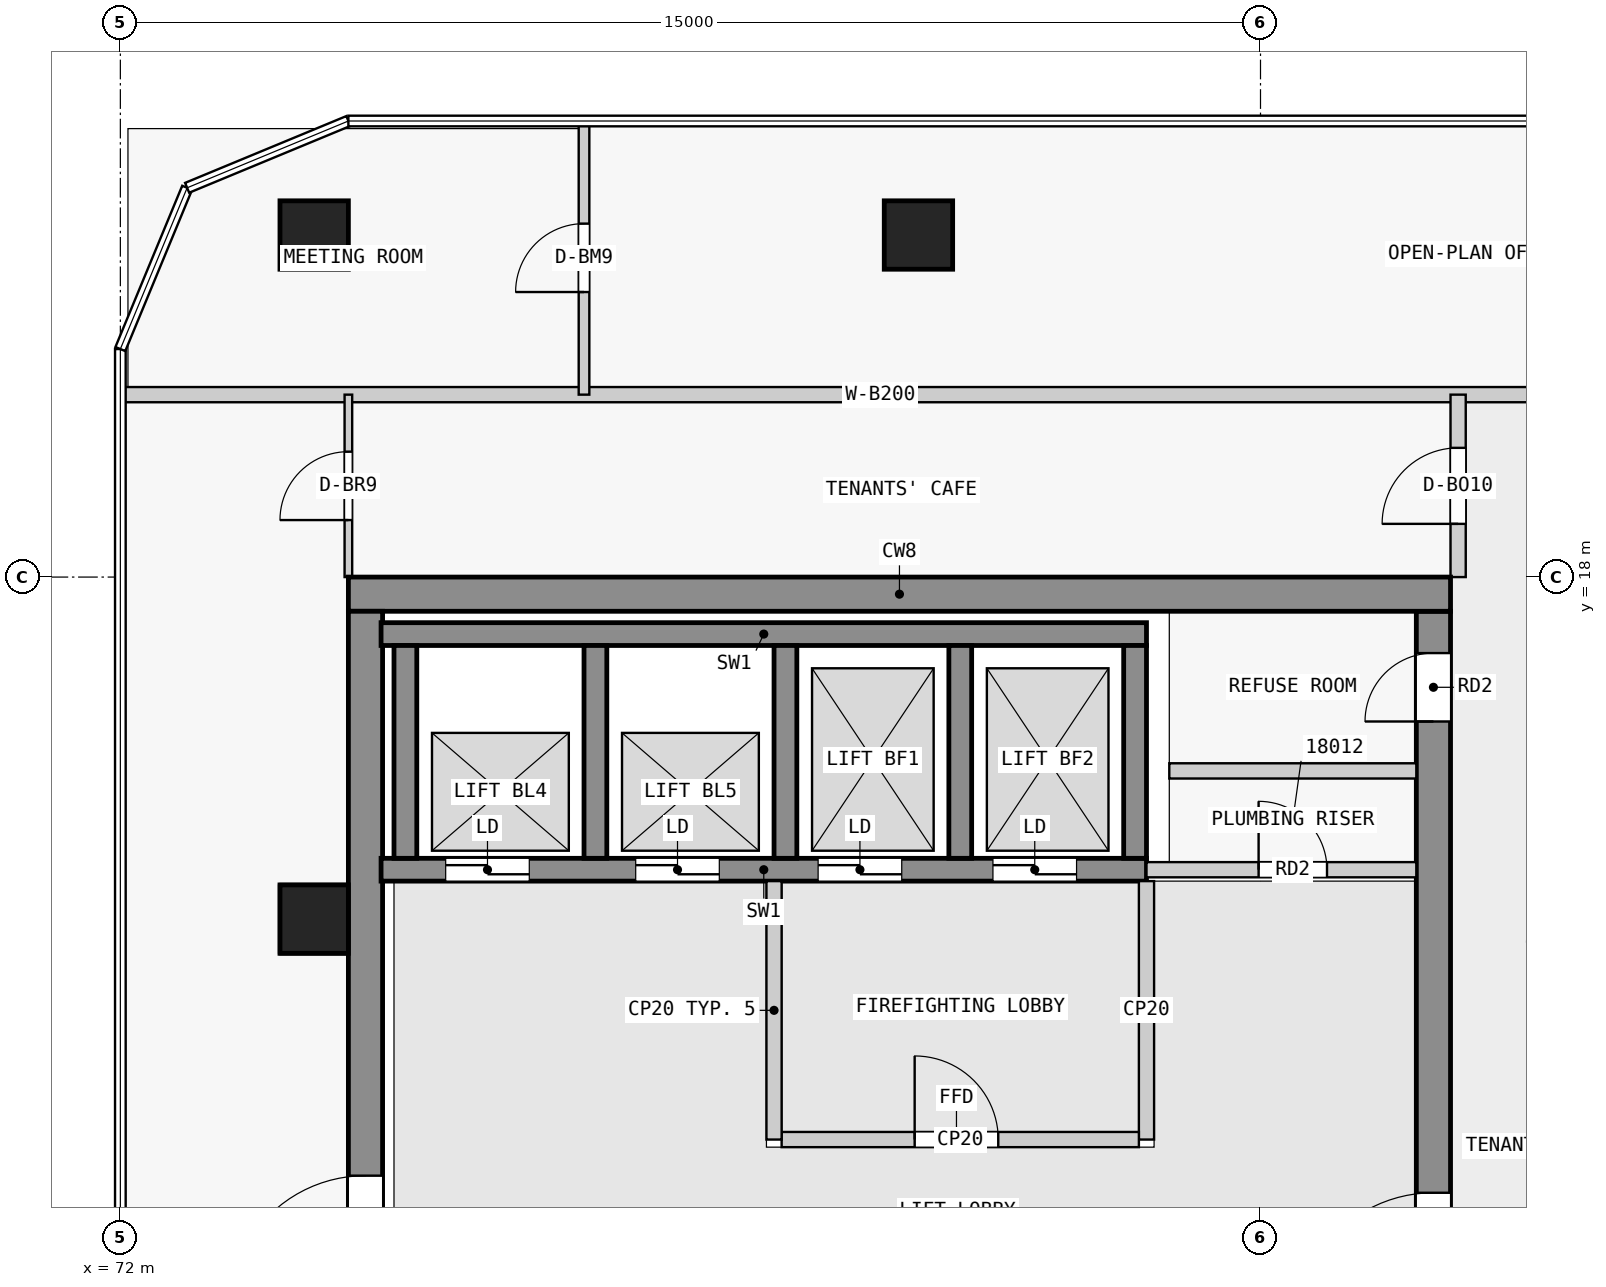
"""IFC4 building model, lengths in metres.
Left out: names, types, materials, properties, quantities, classifications, styles, units other than length and angle.
Written with IfcOpenShell. Run it as: python <this file> out.ifc"""

import sys

from ifc_helpers import new_model, si_unit, direction, frame, frame_2d, origin, origin_2d, place, context, subcontext, project, spatial, rectangle, extrude, element, fill, save


model = new_model("IFC4")
c1 = context("Model", 3, precision=1e-05, world=origin(), true_north=direction((0.0, 1.0)))
c2 = subcontext(c1, "Body", "Model", "MODEL_VIEW")
j1 = project(units=[si_unit("LENGTHUNIT", "METRE"), si_unit("PLANEANGLEUNIT", "RADIAN")], contexts=[c1])
p1 = place(None, origin())
s1 = spatial("IfcSite", under=j1, at=p1, CompositionType="ELEMENT")
p2 = place(p1, origin())
s2 = spatial("IfcBuilding", under=s1, at=p2, CompositionType="ELEMENT")
p3 = place(p2, frame((0.0, 0.0, 72.3)))
s3 = spatial("IfcBuildingStorey", under=s2, at=p3, CompositionType="ELEMENT", Elevation=72.3)
for number, where, z_axis, x_axis in (
    (1, (82.5, 22.5, 0.0), (0.0, 0.0, 1.0), (1.0, 0.0, 0.0)),
    (2, (74.55, 22.5, 0.0), (0.0, 0.0, 1.0), (1.0, 0.0, 0.0)),
    (3, (74.55, 13.5, 0.0), (0.0, 0.0, 1.0), (1.0, 0.0, 0.0)),
):
    element("IfcColumn", number, at=place(p3, frame(where, z_axis=z_axis, x_axis=x_axis)), inside=s3, PredefinedType="COLUMN", context=c2, shape_type="SweptSolid", body=[
        extrude(rectangle(XDim=0.9, YDim=0.9, at=origin_2d()), origin(), (0.0, 0.0, 1.0), 6.0),
    ])
p4 = place(p3, frame((75.0, 17.775, 0.0), z_axis=(0.0, 0.0, 1.0), x_axis=(1.0, 0.0, 0.0)))
e4 = element("IfcWall", 4, at=p4, inside=s3, PredefinedType="SHEAR", context=c2, shape_type="SweptSolid", body=[
    extrude(rectangle(XDim=14.5, YDim=0.45, at=frame_2d((7.25, 0.0))), origin(), (0.0, 0.0, 1.0), 5.75),
])
p5 = place(p3, frame((75.225, 0.45, 0.0), z_axis=(0.0, 0.0, 1.0), x_axis=(0.0, 1.0, 0.0)))
e5 = element("IfcWall", 5, at=p5, inside=s3, PredefinedType="SHEAR", context=c2, shape_type="SweptSolid", body=[
    extrude(rectangle(XDim=17.1, YDim=0.45, at=frame_2d((8.55, 0.0))), origin(), (0.0, 0.0, 1.0), 5.75),
])
p6 = place(p5, frame((7.875, 0.0, 0.0)))
e6 = element("IfcOpeningElement", 6, at=p6, cuts=e5, PredefinedType="OPENING", context=c2, shape_type="SweptSolid", body=[
    extrude(rectangle(XDim=1.8, YDim=2.1, at=frame_2d((0.9, 1.05))), frame((0.0, 0.235, 0.0), z_axis=(0.0, -1.0, 0.0), x_axis=(1.0, 0.0, 0.0)), (0.0, 0.0, 1.0), 0.47),
])
p7 = place(p3, frame((89.275, 0.45, 0.0), z_axis=(0.0, 0.0, 1.0), x_axis=(0.0, 1.0, 0.0)))
e7 = element("IfcWall", 7, at=p7, inside=s3, PredefinedType="SHEAR", context=c2, shape_type="SweptSolid", body=[
    extrude(rectangle(XDim=17.1, YDim=0.45, at=frame_2d((8.55, 0.0))), origin(), (0.0, 0.0, 1.0), 5.75),
])
p8 = place(p7, frame((7.65, 0.0, 0.0)))
e8 = element("IfcOpeningElement", 8, at=p8, cuts=e7, PredefinedType="OPENING", context=c2, shape_type="SweptSolid", body=[
    extrude(rectangle(XDim=1.8, YDim=2.1, at=frame_2d((0.9, 1.05))), frame((0.0, 0.235, 0.0), z_axis=(0.0, -1.0, 0.0), x_axis=(1.0, 0.0, 0.0)), (0.0, 0.0, 1.0), 0.47),
])
p9 = place(p7, frame((15.65, 0.0, 0.0)))
e9 = element("IfcOpeningElement", 9, at=p9, cuts=e7, PredefinedType="OPENING", context=c2, shape_type="SweptSolid", body=[
    extrude(rectangle(XDim=0.9, YDim=2.1, at=frame_2d((0.45, 1.05))), frame((0.0, 0.235, 0.0), z_axis=(0.0, -1.0, 0.0), x_axis=(1.0, 0.0, 0.0)), (0.0, 0.0, 1.0), 0.47),
])
p10 = place(p3, frame((75.43, 17.25, 0.0), z_axis=(0.0, 0.0, 1.0), x_axis=(1.0, 0.0, 0.0)))
e10 = element("IfcWall", 10, at=p10, inside=s3, PredefinedType="SHEAR", context=c2, shape_type="SweptSolid", body=[
    extrude(rectangle(XDim=10.07, YDim=0.3, at=frame_2d((5.035, 0.0))), origin(), (0.0, 0.0, 1.0), 5.75),
])
p11 = place(p3, frame((75.43, 14.15, 0.0), z_axis=(0.0, 0.0, 1.0), x_axis=(1.0, 0.0, 0.0)))
e11 = element("IfcWall", 11, at=p11, inside=s3, PredefinedType="SHEAR", context=c2, shape_type="SweptSolid", body=[
    extrude(rectangle(XDim=10.07, YDim=0.3, at=frame_2d((5.035, 0.0))), origin(), (0.0, 0.0, 1.0), 5.75),
])
p12 = place(p11, frame((0.85, 0.0, 0.0)))
e12 = element("IfcOpeningElement", 12, at=p12, cuts=e11, PredefinedType="OPENING", context=c2, shape_type="SweptSolid", body=[
    extrude(rectangle(XDim=1.1, YDim=2.1, at=frame_2d((0.55, 1.05))), frame((0.0, 0.16, 0.0), z_axis=(0.0, -1.0, 0.0), x_axis=(1.0, 0.0, 0.0)), (0.0, 0.0, 1.0), 0.32),
])
p13 = place(p11, frame((3.35, 0.0, 0.0)))
e13 = element("IfcOpeningElement", 13, at=p13, cuts=e11, PredefinedType="OPENING", context=c2, shape_type="SweptSolid", body=[
    extrude(rectangle(XDim=1.1, YDim=2.1, at=frame_2d((0.55, 1.05))), frame((0.0, 0.16, 0.0), z_axis=(0.0, -1.0, 0.0), x_axis=(1.0, 0.0, 0.0)), (0.0, 0.0, 1.0), 0.32),
])
p14 = place(p11, frame((5.75, 0.0, 0.0)))
e14 = element("IfcOpeningElement", 14, at=p14, cuts=e11, PredefinedType="OPENING", context=c2, shape_type="SweptSolid", body=[
    extrude(rectangle(XDim=1.1, YDim=2.1, at=frame_2d((0.55, 1.05))), frame((0.0, 0.16, 0.0), z_axis=(0.0, -1.0, 0.0), x_axis=(1.0, 0.0, 0.0)), (0.0, 0.0, 1.0), 0.32),
])
p15 = place(p11, frame((8.05, 0.0, 0.0)))
e15 = element("IfcOpeningElement", 15, at=p15, cuts=e11, PredefinedType="OPENING", context=c2, shape_type="SweptSolid", body=[
    extrude(rectangle(XDim=1.1, YDim=2.1, at=frame_2d((0.55, 1.05))), frame((0.0, 0.16, 0.0), z_axis=(0.0, -1.0, 0.0), x_axis=(1.0, 0.0, 0.0)), (0.0, 0.0, 1.0), 0.32),
])
for number, where, z_axis, x_axis in (
    (16, (75.75, 14.3, 0.0), (0.0, 0.0, 1.0), (0.0, 1.0, 0.0)),
    (17, (78.25, 14.3, 0.0), (0.0, 0.0, 1.0), (0.0, 1.0, 0.0)),
    (18, (80.75, 14.3, 0.0), (0.0, 0.0, 1.0), (0.0, 1.0, 0.0)),
    (19, (83.05, 14.3, 0.0), (0.0, 0.0, 1.0), (0.0, 1.0, 0.0)),
    (20, (85.35, 14.3, 0.0), (0.0, 0.0, 1.0), (0.0, 1.0, 0.0)),
):
    element("IfcWall", number, at=place(p3, frame(where, z_axis=z_axis, x_axis=x_axis)), inside=s3, PredefinedType="SHEAR", context=c2, shape_type="SweptSolid", body=[
        extrude(rectangle(XDim=2.8, YDim=0.3, at=frame_2d((1.4, 0.0))), origin(), (0.0, 0.0, 1.0), 5.75),
    ])
p16 = place(p3, frame((80.6, 10.6, 0.0), z_axis=(0.0, 0.0, 1.0), x_axis=(0.0, 1.0, 0.0)))
e21 = element("IfcWall", 21, at=p16, inside=s3, PredefinedType="PARTITIONING", context=c2, shape_type="SweptSolid", body=[
    extrude(rectangle(XDim=3.4, YDim=0.2, at=frame_2d((1.7, 0.0))), origin(), (0.0, 0.0, 1.0), 5.75),
])
p17 = place(p3, frame((80.7, 10.6, 0.0), z_axis=(0.0, 0.0, 1.0), x_axis=(1.0, 0.0, 0.0)))
e22 = element("IfcWall", 22, at=p17, inside=s3, PredefinedType="PARTITIONING", context=c2, shape_type="SweptSolid", body=[
    extrude(rectangle(XDim=4.7, YDim=0.2, at=frame_2d((2.35, 0.0))), origin(), (0.0, 0.0, 1.0), 5.75),
])
p18 = place(p17, frame((1.75, 0.0, 0.0)))
e23 = element("IfcOpeningElement", 23, at=p18, cuts=e22, PredefinedType="OPENING", context=c2, shape_type="SweptSolid", body=[
    extrude(rectangle(XDim=1.1, YDim=2.1, at=frame_2d((0.55, 1.05))), frame((0.0, 0.11, 0.0), z_axis=(0.0, -1.0, 0.0), x_axis=(1.0, 0.0, 0.0)), (0.0, 0.0, 1.0), 0.22),
])
p19 = place(p3, frame((85.5, 10.6, 0.0), z_axis=(0.0, 0.0, 1.0), x_axis=(0.0, 1.0, 0.0)))
e24 = element("IfcWall", 24, at=p19, inside=s3, PredefinedType="PARTITIONING", context=c2, shape_type="SweptSolid", body=[
    extrude(rectangle(XDim=3.4, YDim=0.2, at=frame_2d((1.7, 0.0))), origin(), (0.0, 0.0, 1.0), 5.75),
])
p20 = place(p3, frame((85.5, 14.15, 0.0), z_axis=(0.0, 0.0, 1.0), x_axis=(1.0, 0.0, 0.0)))
e25 = element("IfcWall", 25, at=p20, inside=s3, PredefinedType="PARTITIONING", context=c2, shape_type="SweptSolid", body=[
    extrude(rectangle(XDim=3.55, YDim=0.2, at=frame_2d((1.775, 0.0))), origin(), (0.0, 0.0, 1.0), 5.75),
])
p21 = place(p20, frame((1.475, 0.0, 0.0)))
e26 = element("IfcOpeningElement", 26, at=p21, cuts=e25, PredefinedType="OPENING", context=c2, shape_type="SweptSolid", body=[
    extrude(rectangle(XDim=0.9, YDim=2.1, at=frame_2d((0.45, 1.05))), frame((0.0, 0.11, 0.0), z_axis=(0.0, -1.0, 0.0), x_axis=(1.0, 0.0, 0.0)), (0.0, 0.0, 1.0), 0.22),
])
p22 = place(p3, frame((85.8, 15.45, 0.0), z_axis=(0.0, 0.0, 1.0), x_axis=(1.0, 0.0, 0.0)))
e27 = element("IfcWall", 27, at=p22, inside=s3, PredefinedType="PARTITIONING", context=c2, shape_type="SweptSolid", body=[
    extrude(rectangle(XDim=3.25, YDim=0.2, at=frame_2d((1.625, 0.0))), origin(), (0.0, 0.0, 1.0), 5.75),
])
p23 = place(p3, frame((72.0, 20.4, 0.0), z_axis=(0.0, 0.0, 1.0), x_axis=(1.0, 0.0, 0.0)))
e28 = element("IfcWall", 28, at=p23, inside=s3, PredefinedType="PARTITIONING", context=c2, shape_type="SweptSolid", body=[
    extrude(rectangle(XDim=20.0, YDim=0.2, at=frame_2d((10.0, 0.0))), origin(), (0.0, 0.0, 1.0), 5.75),
])
p24 = place(p3, frame((75.0, 18.0, 0.0), z_axis=(0.0, 0.0, 1.0), x_axis=(0.0, 1.0, 0.0)))
e29 = element("IfcWall", 29, at=p24, inside=s3, PredefinedType="PARTITIONING", context=c2, shape_type="SweptSolid", body=[
    extrude(rectangle(XDim=2.4, YDim=0.1, at=frame_2d((1.2, 0.0))), origin(), (0.0, 0.0, 1.0), 5.75),
])
p25 = place(p24, frame((0.75, 0.0, 0.0)))
e30 = element("IfcOpeningElement", 30, at=p25, cuts=e29, PredefinedType="OPENING", context=c2, shape_type="SweptSolid", body=[
    extrude(rectangle(XDim=0.9, YDim=2.1, at=frame_2d((0.45, 1.05))), frame((0.0, 0.06, 0.0), z_axis=(0.0, -1.0, 0.0), x_axis=(1.0, 0.0, 0.0)), (0.0, 0.0, 1.0), 0.12),
])
p26 = place(p3, frame((89.6, 18.0, 0.0), z_axis=(0.0, 0.0, 1.0), x_axis=(0.0, 1.0, 0.0)))
e31 = element("IfcWall", 31, at=p26, inside=s3, PredefinedType="PARTITIONING", context=c2, shape_type="SweptSolid", body=[
    extrude(rectangle(XDim=2.4, YDim=0.2, at=frame_2d((1.2, 0.0))), origin(), (0.0, 0.0, 1.0), 5.75),
])
p27 = place(p26, frame((0.7, 0.0, 0.0)))
e32 = element("IfcOpeningElement", 32, at=p27, cuts=e31, PredefinedType="OPENING", context=c2, shape_type="SweptSolid", body=[
    extrude(rectangle(XDim=1.0, YDim=2.4, at=frame_2d((0.5, 1.2))), frame((0.0, 0.11, 0.0), z_axis=(0.0, -1.0, 0.0), x_axis=(1.0, 0.0, 0.0)), (0.0, 0.0, 1.0), 0.22),
])
p28 = place(p3, frame((78.1, 20.4, 0.0), z_axis=(0.0, 0.0, 1.0), x_axis=(0.0, 1.0, 0.0)))
e33 = element("IfcWall", 33, at=p28, inside=s3, PredefinedType="PARTITIONING", context=c2, shape_type="SweptSolid", body=[
    extrude(rectangle(XDim=3.6, YDim=0.14, at=frame_2d((1.8, 0.0))), origin(), (0.0, 0.0, 1.0), 5.75),
])
p29 = place(p28, frame((1.35, 0.0, 0.0)))
e34 = element("IfcOpeningElement", 34, at=p29, cuts=e33, PredefinedType="OPENING", context=c2, shape_type="SweptSolid", body=[
    extrude(rectangle(XDim=0.9, YDim=2.4, at=frame_2d((0.45, 1.2))), frame((0.0, 0.08, 0.0), z_axis=(0.0, -1.0, 0.0), x_axis=(1.0, 0.0, 0.0)), (0.0, 0.0, 1.0), 0.16),
])
p30 = place(p18, origin())
e35 = element("IfcDoor", 35, at=p30, inside=s3, OperationType="SINGLE_SWING_LEFT", PredefinedType="DOOR", context=c2, shape_type="SweptSolid", body=[
    extrude(rectangle(XDim=1.1, YDim=2.1, at=frame_2d((0.55, 1.05))), frame((0.0, 0.025, 0.0), z_axis=(0.0, -1.0, 0.0), x_axis=(1.0, 0.0, 0.0)), (0.0, 0.0, 1.0), 0.05),
])
fill(e23, e35)
p31 = place(p12, origin())
e36 = element("IfcDoor", 36, at=p31, inside=s3, OperationType="DOUBLE_DOOR_SLIDING", PredefinedType="DOOR", context=c2, shape_type="SweptSolid", body=[
    extrude(rectangle(XDim=1.1, YDim=2.1, at=frame_2d((0.55, 1.05))), frame((0.0, 0.025, 0.0), z_axis=(0.0, -1.0, 0.0), x_axis=(1.0, 0.0, 0.0)), (0.0, 0.0, 1.0), 0.05),
])
fill(e12, e36)
p32 = place(p13, origin())
e37 = element("IfcDoor", 37, at=p32, inside=s3, OperationType="DOUBLE_DOOR_SLIDING", PredefinedType="DOOR", context=c2, shape_type="SweptSolid", body=[
    extrude(rectangle(XDim=1.1, YDim=2.1, at=frame_2d((0.55, 1.05))), frame((0.0, 0.025, 0.0), z_axis=(0.0, -1.0, 0.0), x_axis=(1.0, 0.0, 0.0)), (0.0, 0.0, 1.0), 0.05),
])
fill(e13, e37)
p33 = place(p14, origin())
e38 = element("IfcDoor", 38, at=p33, inside=s3, OperationType="DOUBLE_DOOR_SLIDING", PredefinedType="DOOR", context=c2, shape_type="SweptSolid", body=[
    extrude(rectangle(XDim=1.1, YDim=2.1, at=frame_2d((0.55, 1.05))), frame((0.0, 0.025, 0.0), z_axis=(0.0, -1.0, 0.0), x_axis=(1.0, 0.0, 0.0)), (0.0, 0.0, 1.0), 0.05),
])
fill(e14, e38)
p34 = place(p15, origin())
e39 = element("IfcDoor", 39, at=p34, inside=s3, OperationType="DOUBLE_DOOR_SLIDING", PredefinedType="DOOR", context=c2, shape_type="SweptSolid", body=[
    extrude(rectangle(XDim=1.1, YDim=2.1, at=frame_2d((0.55, 1.05))), frame((0.0, 0.025, 0.0), z_axis=(0.0, -1.0, 0.0), x_axis=(1.0, 0.0, 0.0)), (0.0, 0.0, 1.0), 0.05),
])
fill(e15, e39)
p35 = place(p6, origin())
e40 = element("IfcDoor", 40, at=p35, inside=s3, OperationType="DOUBLE_DOOR_SINGLE_SWING", PredefinedType="DOOR", context=c2, shape_type="SweptSolid", body=[
    extrude(rectangle(XDim=1.8, YDim=2.1, at=frame_2d((0.9, 1.05))), frame((0.0, 0.025, 0.0), z_axis=(0.0, -1.0, 0.0), x_axis=(1.0, 0.0, 0.0)), (0.0, 0.0, 1.0), 0.05),
])
fill(e6, e40)
p36 = place(p8, origin())
e41 = element("IfcDoor", 41, at=p36, inside=s3, OperationType="DOUBLE_DOOR_SINGLE_SWING", PredefinedType="DOOR", context=c2, shape_type="SweptSolid", body=[
    extrude(rectangle(XDim=1.8, YDim=2.1, at=frame_2d((0.9, 1.05))), frame((0.0, 0.025, 0.0), z_axis=(0.0, -1.0, 0.0), x_axis=(1.0, 0.0, 0.0)), (0.0, 0.0, 1.0), 0.05),
])
fill(e8, e41)
p37 = place(p21, origin())
e42 = element("IfcDoor", 42, at=p37, inside=s3, OperationType="SINGLE_SWING_LEFT", PredefinedType="DOOR", context=c2, shape_type="SweptSolid", body=[
    extrude(rectangle(XDim=0.9, YDim=2.1, at=frame_2d((0.45, 1.05))), frame((0.0, 0.025, 0.0), z_axis=(0.0, -1.0, 0.0), x_axis=(1.0, 0.0, 0.0)), (0.0, 0.0, 1.0), 0.05),
])
fill(e26, e42)
p38 = place(p9, origin())
e43 = element("IfcDoor", 43, at=p38, inside=s3, OperationType="SINGLE_SWING_LEFT", PredefinedType="DOOR", context=c2, shape_type="SweptSolid", body=[
    extrude(rectangle(XDim=0.9, YDim=2.1, at=frame_2d((0.45, 1.05))), frame((0.0, 0.025, 0.0), z_axis=(0.0, -1.0, 0.0), x_axis=(1.0, 0.0, 0.0)), (0.0, 0.0, 1.0), 0.05),
])
fill(e9, e43)
p39 = place(p25, origin())
e44 = element("IfcDoor", 44, at=p39, inside=s3, OperationType="SINGLE_SWING_LEFT", PredefinedType="DOOR", context=c2, shape_type="SweptSolid", body=[
    extrude(rectangle(XDim=0.9, YDim=2.1, at=frame_2d((0.45, 1.05))), frame((0.0, 0.025, 0.0), z_axis=(0.0, -1.0, 0.0), x_axis=(1.0, 0.0, 0.0)), (0.0, 0.0, 1.0), 0.05),
])
fill(e30, e44)
p40 = place(p27, origin())
e45 = element("IfcDoor", 45, at=p40, inside=s3, OperationType="SINGLE_SWING_LEFT", PredefinedType="DOOR", context=c2, shape_type="SweptSolid", body=[
    extrude(rectangle(XDim=1.0, YDim=2.4, at=frame_2d((0.5, 1.2))), frame((0.0, 0.025, 0.0), z_axis=(0.0, -1.0, 0.0), x_axis=(1.0, 0.0, 0.0)), (0.0, 0.0, 1.0), 0.05),
])
fill(e32, e45)
p41 = place(p29, origin())
e46 = element("IfcDoor", 46, at=p41, inside=s3, OperationType="SINGLE_SWING_LEFT", PredefinedType="DOOR", context=c2, shape_type="SweptSolid", body=[
    extrude(rectangle(XDim=0.9, YDim=2.4, at=frame_2d((0.45, 1.2))), frame((0.0, 0.025, 0.0), z_axis=(0.0, -1.0, 0.0), x_axis=(1.0, 0.0, 0.0)), (0.0, 0.0, 1.0), 0.05),
])
fill(e34, e46)
save(model, sys.argv[1])
